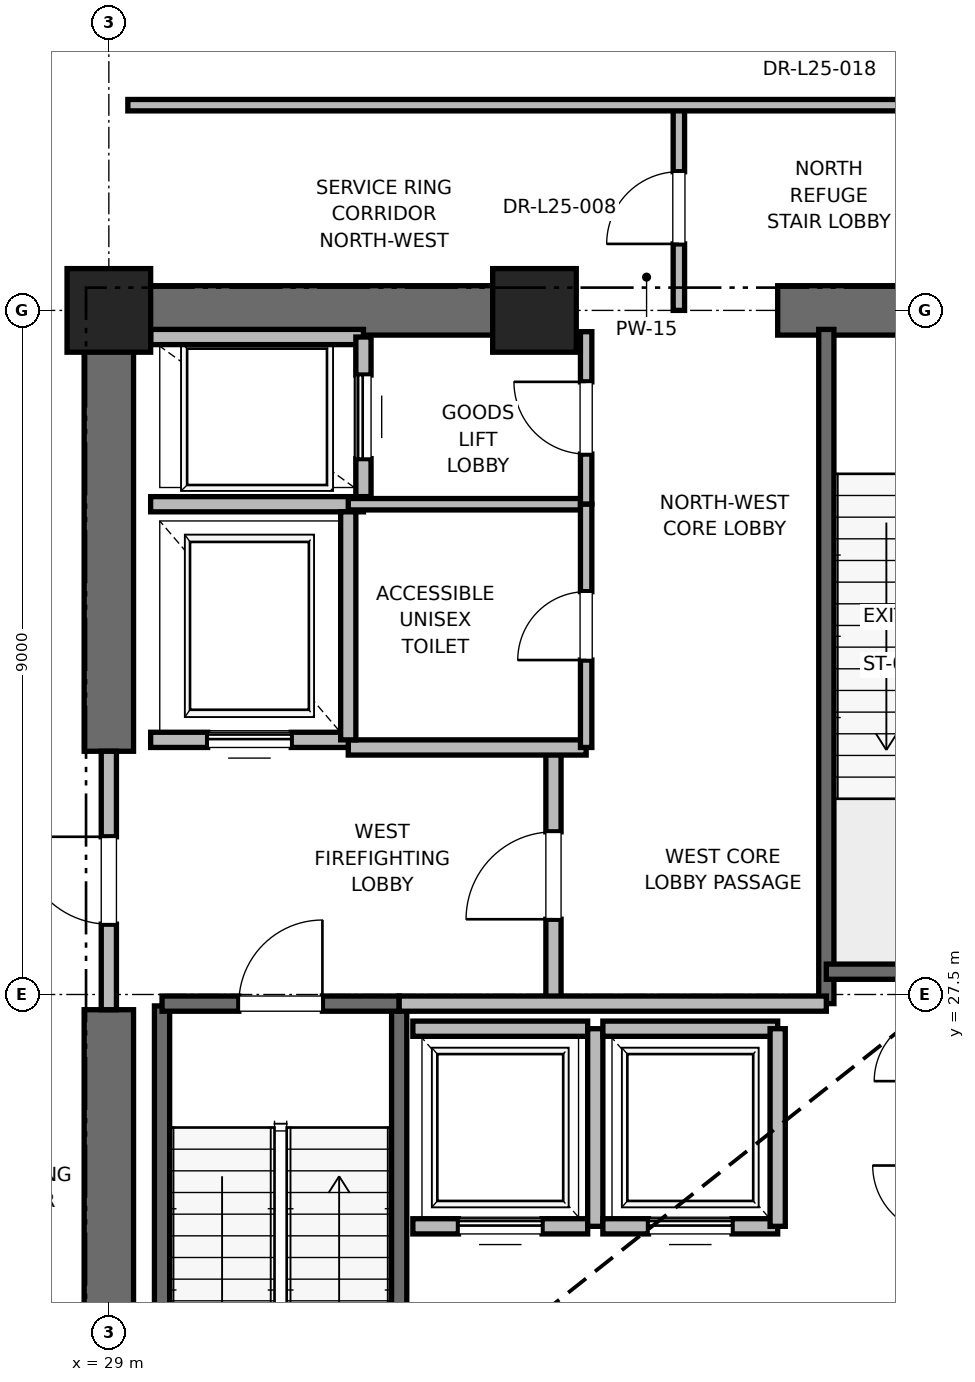
"""IFC4 building model, lengths in metres.
Left out: names, types, materials, properties, quantities, classifications, styles, units other than length and angle.
Written with IfcOpenShell. Run it as: python <this file> out.ifc"""

import sys

from ifc_helpers import new_model, si_unit, direction, frame, frame_2d, origin, origin_2d, place, context, subcontext, project, spatial, rectangle, extrude, element, fill, save


model = new_model("IFC4")
c1 = context("Model", 3, precision=1e-05, world=origin(), true_north=direction((0.0, 1.0)))
c2 = subcontext(c1, "Body", "Model", "MODEL_VIEW")
j1 = project(units=[si_unit("LENGTHUNIT", "METRE"), si_unit("PLANEANGLEUNIT", "RADIAN")], contexts=[c1])
p1 = place(None, origin())
s1 = spatial("IfcSite", under=j1, at=p1, CompositionType="ELEMENT")
p2 = place(p1, origin())
s2 = spatial("IfcBuilding", under=s1, at=p2, CompositionType="ELEMENT")
p3 = place(p2, frame((0.0, 0.0, 107.6)))
s3 = spatial("IfcBuildingStorey", under=s2, at=p3, CompositionType="ELEMENT", Elevation=107.6)
for number, where, z_axis, x_axis in (
    (1, (29.0, 36.5, 0.0), (0.0, 0.0, 1.0), (1.0, 0.0, 0.0)),
    (2, (34.6, 36.5, 0.0), (0.0, 0.0, 1.0), (1.0, 0.0, 0.0)),
):
    element("IfcColumn", number, at=place(p3, frame(where, z_axis=z_axis, x_axis=x_axis)), inside=s3, PredefinedType="PILASTER", context=c2, shape_type="SweptSolid", body=[
        extrude(rectangle(XDim=1.1, YDim=1.1, at=origin_2d()), origin(), (0.0, 0.0, 1.0), 5.4),
    ])
p4 = place(p3, frame((29.0, 36.5, 0.0), z_axis=(0.0, 0.0, 1.0), x_axis=(1.0, 0.0, 0.0)))
e3 = element("IfcWall", 3, at=p4, inside=s3, PredefinedType="SHEAR", context=c2, shape_type="SweptSolid", body=[
    extrude(rectangle(XDim=5.8, YDim=0.65, at=frame_2d((2.9, 0.0))), origin(), (0.0, 0.0, 1.0), 5.1),
])
p5 = place(p3, frame((37.8, 36.5, 0.0), z_axis=(0.0, 0.0, 1.0), x_axis=(1.0, 0.0, 0.0)))
e4 = element("IfcWall", 4, at=p5, inside=s3, PredefinedType="SHEAR", context=c2, shape_type="SweptSolid", body=[
    extrude(rectangle(XDim=4.4, YDim=0.65, at=frame_2d((2.2, 0.0))), origin(), (0.0, 0.0, 1.0), 5.1),
])
p6 = place(p5, frame((1.65, 0.0, 0.0)))
e5 = element("IfcOpeningElement", 5, at=p6, cuts=e4, PredefinedType="OPENING", context=c2, shape_type="SweptSolid", body=[
    extrude(rectangle(XDim=1.1, YDim=2.15, at=frame_2d((0.55, 1.075))), frame((0.0, 0.325, 0.0), z_axis=(0.0, -1.0, 0.0), x_axis=(1.0, 0.0, 0.0)), (0.0, 0.0, 1.0), 0.65),
])
p7 = place(p3, frame((29.0, 18.5, 0.0), z_axis=(0.0, 0.0, 1.0), x_axis=(0.0, 1.0, 0.0)))
e6 = element("IfcWall", 6, at=p7, inside=s3, PredefinedType="SHEAR", context=c2, shape_type="SweptSolid", body=[
    extrude(rectangle(XDim=8.8, YDim=0.65, at=frame_2d((4.4, 0.0))), origin(), (0.0, 0.0, 1.0), 5.1),
])
p8 = place(p3, frame((29.0, 30.7, 0.0), z_axis=(0.0, 0.0, 1.0), x_axis=(0.0, 1.0, 0.0)))
e7 = element("IfcWall", 7, at=p8, inside=s3, PredefinedType="SHEAR", context=c2, shape_type="SweptSolid", body=[
    extrude(rectangle(XDim=5.8, YDim=0.65, at=frame_2d((2.9, 0.0))), origin(), (0.0, 0.0, 1.0), 5.1),
])
p9 = place(p3, frame((29.7, 19.2, 0.0), z_axis=(0.0, 0.0, 1.0), x_axis=(0.0, 1.0, 0.0)))
e8 = element("IfcWall", 8, at=p9, inside=s3, PredefinedType="SOLIDWALL", context=c2, shape_type="SweptSolid", body=[
    extrude(rectangle(XDim=8.15, YDim=0.2, at=frame_2d((4.075, 0.0))), origin(), (0.0, 0.0, 1.0), 5.1),
])
p10 = place(p3, frame((32.82, 18.6, 0.0), z_axis=(0.0, 0.0, 1.0), x_axis=(0.0, 1.0, 0.0)))
e9 = element("IfcWall", 9, at=p10, inside=s3, PredefinedType="SOLIDWALL", context=c2, shape_type="SweptSolid", body=[
    extrude(rectangle(XDim=8.78, YDim=0.2, at=frame_2d((4.39, 0.0))), origin(), (0.0, 0.0, 1.0), 5.1),
])
p11 = place(p3, frame((29.7, 27.38, 0.0), z_axis=(0.0, 0.0, 1.0), x_axis=(1.0, 0.0, 0.0)))
e10 = element("IfcWall", 10, at=p11, inside=s3, PredefinedType="SOLIDWALL", context=c2, shape_type="SweptSolid", body=[
    extrude(rectangle(XDim=3.12, YDim=0.2, at=frame_2d((1.56, 0.0))), origin(), (0.0, 0.0, 1.0), 5.1),
])
p12 = place(p11, frame((1.01, 0.0, 0.0)))
e11 = element("IfcOpeningElement", 11, at=p12, cuts=e10, PredefinedType="OPENING", context=c2, shape_type="SweptSolid", body=[
    extrude(rectangle(XDim=1.1, YDim=2.15, at=frame_2d((0.55, 1.075))), frame((0.0, 0.1, 0.0), z_axis=(0.0, -1.0, 0.0), x_axis=(1.0, 0.0, 0.0)), (0.0, 0.0, 1.0), 0.2),
])
p13 = place(p3, frame((38.44, 27.38, 0.0), z_axis=(0.0, 0.0, 1.0), x_axis=(0.0, 1.0, 0.0)))
e12 = element("IfcWall", 12, at=p13, inside=s3, PredefinedType="SOLIDWALL", context=c2, shape_type="SweptSolid", body=[
    extrude(rectangle(XDim=8.87, YDim=0.2, at=frame_2d((4.435, 0.0))), origin(), (0.0, 0.0, 1.0), 5.1),
])
p14 = place(p3, frame((38.44, 27.8, 0.0), z_axis=(0.0, 0.0, 1.0), x_axis=(1.0, 0.0, 0.0)))
e13 = element("IfcWall", 13, at=p14, inside=s3, PredefinedType="SOLIDWALL", context=c2, shape_type="SweptSolid", body=[
    extrude(rectangle(XDim=3.32, YDim=0.2, at=frame_2d((1.66, 0.0))), origin(), (0.0, 0.0, 1.0), 5.1),
])
p15 = place(p3, frame((34.85, 27.38, 0.0), z_axis=(0.0, 0.0, 1.0), x_axis=(0.0, 1.0, 0.0)))
e14 = element("IfcWall", 14, at=p15, inside=s3, PredefinedType="PARTITIONING", context=c2, shape_type="SweptSolid", body=[
    extrude(rectangle(XDim=3.37, YDim=0.2, at=frame_2d((1.685, 0.0))), origin(), (0.0, 0.0, 1.0), 5.1),
])
p16 = place(p15, frame((1.11, 0.0, 0.0)))
e15 = element("IfcOpeningElement", 15, at=p16, cuts=e14, PredefinedType="OPENING", context=c2, shape_type="SweptSolid", body=[
    extrude(rectangle(XDim=1.15, YDim=2.2, at=frame_2d((0.575, 1.1))), frame((0.0, 0.1, 0.0), z_axis=(0.0, -1.0, 0.0), x_axis=(1.0, 0.0, 0.0)), (0.0, 0.0, 1.0), 0.2),
])
p17 = place(p3, frame((29.0, 27.3, 0.0), z_axis=(0.0, 0.0, 1.0), x_axis=(0.0, 1.0, 0.0)))
e16 = element("IfcWall", 16, at=p17, inside=s3, PredefinedType="PARTITIONING", context=c2, shape_type="SweptSolid", body=[
    extrude(rectangle(XDim=3.4, YDim=0.2, at=frame_2d((1.7, 0.0))), origin(), (0.0, 0.0, 1.0), 3.88),
])
p18 = place(p17, frame((1.125, 0.0, 0.0)))
e17 = element("IfcOpeningElement", 17, at=p18, cuts=e16, PredefinedType="OPENING", context=c2, shape_type="SweptSolid", body=[
    extrude(rectangle(XDim=1.15, YDim=2.2, at=frame_2d((0.575, 1.1))), frame((0.0, 0.1, 0.0), z_axis=(0.0, -1.0, 0.0), x_axis=(1.0, 0.0, 0.0)), (0.0, 0.0, 1.0), 0.2),
])
p19 = place(p3, frame((32.82, 27.38, 0.0), z_axis=(0.0, 0.0, 1.0), x_axis=(1.0, 0.0, 0.0)))
e18 = element("IfcWall", 18, at=p19, inside=s3, PredefinedType="PARTITIONING", context=c2, shape_type="SweptSolid", body=[
    extrude(rectangle(XDim=5.62, YDim=0.2, at=frame_2d((2.81, 0.0))), origin(), (0.0, 0.0, 1.0), 5.1),
])
p20 = place(p3, frame((32.15, 30.75, 0.0), z_axis=(0.0, 0.0, 1.0), x_axis=(1.0, 0.0, 0.0)))
e19 = element("IfcWall", 19, at=p20, inside=s3, PredefinedType="PARTITIONING", context=c2, shape_type="SweptSolid", body=[
    extrude(rectangle(XDim=3.13, YDim=0.2, at=frame_2d((1.565, 0.0))), origin(), (0.0, 0.0, 1.0), 5.1),
])
p21 = place(p3, frame((29.55, 30.85, 0.0), z_axis=(0.0, 0.0, 1.0), x_axis=(1.0, 0.0, 0.0)))
e20 = element("IfcWall", 20, at=p21, inside=s3, PredefinedType="SOLIDWALL", context=c2, shape_type="SweptSolid", body=[
    extrude(rectangle(XDim=2.6, YDim=0.2, at=frame_2d((1.3, 0.0))), origin(), (0.0, 0.0, 1.0), 3.88),
])
p22 = place(p21, frame((0.75, 0.0, 0.0)))
e21 = element("IfcOpeningElement", 21, at=p22, cuts=e20, PredefinedType="OPENING", context=c2, shape_type="SweptSolid", body=[
    extrude(rectangle(XDim=1.1, YDim=2.2, at=frame_2d((0.55, 1.1))), frame((0.0, 0.1, 0.0), z_axis=(0.0, -1.0, 0.0), x_axis=(1.0, 0.0, 0.0)), (0.0, 0.0, 1.0), 0.2),
])
p23 = place(p3, frame((29.55, 33.95, 0.0), z_axis=(0.0, 0.0, 1.0), x_axis=(1.0, 0.0, 0.0)))
e22 = element("IfcWall", 22, at=p23, inside=s3, PredefinedType="SOLIDWALL", context=c2, shape_type="SweptSolid", body=[
    extrude(rectangle(XDim=2.8, YDim=0.2, at=frame_2d((1.4, 0.0))), origin(), (0.0, 0.0, 1.0), 5.1),
])
p24 = place(p3, frame((32.15, 30.85, 0.0), z_axis=(0.0, 0.0, 1.0), x_axis=(0.0, 1.0, 0.0)))
e23 = element("IfcWall", 23, at=p24, inside=s3, PredefinedType="SOLIDWALL", context=c2, shape_type="SweptSolid", body=[
    extrude(rectangle(XDim=3.0, YDim=0.2, at=frame_2d((1.5, 0.0))), origin(), (0.0, 0.0, 1.0), 5.1),
])
p25 = place(p3, frame((32.35, 36.15, 0.0), z_axis=(0.0, 0.0, 1.0), x_axis=(-1.0, 0.0, 0.0)))
e24 = element("IfcWall", 24, at=p25, inside=s3, PredefinedType="SOLIDWALL", context=c2, shape_type="SweptSolid", body=[
    extrude(rectangle(XDim=2.8, YDim=0.2, at=frame_2d((1.4, 0.0))), origin(), (0.0, 0.0, 1.0), 4.153),
])
p26 = place(p3, frame((32.35, 34.05, 0.0), z_axis=(0.0, 0.0, 1.0), x_axis=(0.0, 1.0, 0.0)))
e25 = element("IfcWall", 25, at=p26, inside=s3, PredefinedType="SOLIDWALL", context=c2, shape_type="SweptSolid", body=[
    extrude(rectangle(XDim=2.1, YDim=0.2, at=frame_2d((1.05, 0.0))), origin(), (0.0, 0.0, 1.0), 5.1),
])
p27 = place(p26, frame((0.5, 0.0, 0.0)))
e26 = element("IfcOpeningElement", 26, at=p27, cuts=e25, PredefinedType="OPENING", context=c2, shape_type="SweptSolid", body=[
    extrude(rectangle(XDim=1.1, YDim=2.2, at=frame_2d((0.55, 1.1))), frame((0.0, 0.1, 0.0), z_axis=(0.0, -1.0, 0.0), x_axis=(1.0, 0.0, 0.0)), (0.0, 0.0, 1.0), 0.2),
])
p28 = place(p3, frame((33.0, 24.45, 0.0), z_axis=(0.0, 0.0, 1.0), x_axis=(1.0, 0.0, 0.0)))
e27 = element("IfcWall", 27, at=p28, inside=s3, PredefinedType="SOLIDWALL", context=c2, shape_type="SweptSolid", body=[
    extrude(rectangle(XDim=2.3, YDim=0.2, at=frame_2d((1.15, 0.0))), origin(), (0.0, 0.0, 1.0), 5.1),
])
p29 = place(p28, frame((0.6, 0.0, 0.0)))
e28 = element("IfcOpeningElement", 28, at=p29, cuts=e27, PredefinedType="OPENING", context=c2, shape_type="SweptSolid", body=[
    extrude(rectangle(XDim=1.1, YDim=2.2, at=frame_2d((0.55, 1.1))), frame((0.0, 0.1, 0.0), z_axis=(0.0, -1.0, 0.0), x_axis=(1.0, 0.0, 0.0)), (0.0, 0.0, 1.0), 0.2),
])
p30 = place(p3, frame((35.3, 27.05, 0.0), z_axis=(0.0, 0.0, 1.0), x_axis=(-1.0, 0.0, 0.0)))
e29 = element("IfcWall", 29, at=p30, inside=s3, PredefinedType="SOLIDWALL", context=c2, shape_type="SweptSolid", body=[
    extrude(rectangle(XDim=2.3, YDim=0.2, at=frame_2d((1.15, 0.0))), origin(), (0.0, 0.0, 1.0), 5.1),
])
p31 = place(p3, frame((35.4, 24.45, 0.0), z_axis=(0.0, 0.0, 1.0), x_axis=(0.0, 1.0, 0.0)))
e30 = element("IfcWall", 30, at=p31, inside=s3, PredefinedType="SOLIDWALL", context=c2, shape_type="SweptSolid", body=[
    extrude(rectangle(XDim=2.6, YDim=0.2, at=frame_2d((1.3, 0.0))), origin(), (0.0, 0.0, 1.0), 5.1),
])
p32 = place(p3, frame((35.5, 24.45, 0.0), z_axis=(0.0, 0.0, 1.0), x_axis=(1.0, 0.0, 0.0)))
e31 = element("IfcWall", 31, at=p32, inside=s3, PredefinedType="SOLIDWALL", context=c2, shape_type="SweptSolid", body=[
    extrude(rectangle(XDim=2.3, YDim=0.2, at=frame_2d((1.15, 0.0))), origin(), (0.0, 0.0, 1.0), 5.1),
])
p33 = place(p32, frame((0.6, 0.0, 0.0)))
e32 = element("IfcOpeningElement", 32, at=p33, cuts=e31, PredefinedType="OPENING", context=c2, shape_type="SweptSolid", body=[
    extrude(rectangle(XDim=1.1, YDim=2.2, at=frame_2d((0.55, 1.1))), frame((0.0, 0.1, 0.0), z_axis=(0.0, -1.0, 0.0), x_axis=(1.0, 0.0, 0.0)), (0.0, 0.0, 1.0), 0.2),
])
p34 = place(p3, frame((37.8, 27.05, 0.0), z_axis=(0.0, 0.0, 1.0), x_axis=(-1.0, 0.0, 0.0)))
e33 = element("IfcWall", 33, at=p34, inside=s3, PredefinedType="SOLIDWALL", context=c2, shape_type="SweptSolid", body=[
    extrude(rectangle(XDim=2.3, YDim=0.2, at=frame_2d((1.15, 0.0))), origin(), (0.0, 0.0, 1.0), 5.1),
])
p35 = place(p3, frame((37.8, 24.45, 0.0), z_axis=(0.0, 0.0, 1.0), x_axis=(0.0, 1.0, 0.0)))
e34 = element("IfcWall", 34, at=p35, inside=s3, PredefinedType="SOLIDWALL", context=c2, shape_type="SweptSolid", body=[
    extrude(rectangle(XDim=2.6, YDim=0.2, at=frame_2d((1.3, 0.0))), origin(), (0.0, 0.0, 1.0), 5.1),
])
p36 = place(p3, frame((32.15, 33.95, 0.0), z_axis=(0.0, 0.0, 1.0), x_axis=(1.0, 0.0, 0.0)))
e35 = element("IfcWall", 35, at=p36, inside=s3, PredefinedType="PARTITIONING", context=c2, shape_type="SweptSolid", body=[
    extrude(rectangle(XDim=3.13, YDim=0.15, at=frame_2d((1.565, 0.0))), origin(), (0.0, 0.0, 1.0), 2.85),
])
p37 = place(p3, frame((35.28, 33.95, 0.0), z_axis=(0.0, 0.0, 1.0), x_axis=(0.0, 1.0, 0.0)))
e36 = element("IfcWall", 36, at=p37, inside=s3, PredefinedType="PARTITIONING", context=c2, shape_type="SweptSolid", body=[
    extrude(rectangle(XDim=2.27, YDim=0.15, at=frame_2d((1.135, 0.0))), origin(), (0.0, 0.0, 1.0), 2.85),
])
p38 = place(p37, frame((0.66, 0.0, 0.0)))
e37 = element("IfcOpeningElement", 37, at=p38, cuts=e36, PredefinedType="OPENING", context=c2, shape_type="SweptSolid", body=[
    extrude(rectangle(XDim=0.95, YDim=2.15, at=frame_2d((0.475, 1.075))), frame((0.0, 0.075, 0.0), z_axis=(0.0, -1.0, 0.0), x_axis=(1.0, 0.0, 0.0)), (0.0, 0.0, 1.0), 0.15),
])
p39 = place(p3, frame((35.28, 30.75, 0.0), z_axis=(0.0, 0.0, 1.0), x_axis=(0.0, 1.0, 0.0)))
e38 = element("IfcWall", 38, at=p39, inside=s3, PredefinedType="PARTITIONING", context=c2, shape_type="SweptSolid", body=[
    extrude(rectangle(XDim=3.2, YDim=0.15, at=frame_2d((1.6, 0.0))), origin(), (0.0, 0.0, 1.0), 2.85),
])
p40 = place(p39, frame((1.15, 0.0, 0.0)))
e39 = element("IfcOpeningElement", 39, at=p40, cuts=e38, PredefinedType="OPENING", context=c2, shape_type="SweptSolid", body=[
    extrude(rectangle(XDim=0.9, YDim=2.1, at=frame_2d((0.45, 1.05))), frame((0.0, 0.075, 0.0), z_axis=(0.0, -1.0, 0.0), x_axis=(1.0, 0.0, 0.0)), (0.0, 0.0, 1.0), 0.15),
])
p41 = place(p3, frame((36.5, 36.5, 0.0), z_axis=(0.0, 0.0, 1.0), x_axis=(0.0, 1.0, 0.0)))
e40 = element("IfcWall", 40, at=p41, inside=s3, PredefinedType="PARTITIONING", context=c2, shape_type="SweptSolid", body=[
    extrude(rectangle(XDim=2.7, YDim=0.15, at=frame_2d((1.35, 0.0))), origin(), (0.0, 0.0, 1.0), 2.85),
])
p42 = place(p41, frame((0.875, 0.0, 0.0)))
e41 = element("IfcOpeningElement", 41, at=p42, cuts=e40, PredefinedType="OPENING", context=c2, shape_type="SweptSolid", body=[
    extrude(rectangle(XDim=0.95, YDim=2.15, at=frame_2d((0.475, 1.075))), frame((0.0, 0.075, 0.0), z_axis=(0.0, -1.0, 0.0), x_axis=(1.0, 0.0, 0.0)), (0.0, 0.0, 1.0), 0.15),
])
p43 = place(p3, frame((29.25, 39.2, 0.0), z_axis=(0.0, 0.0, 1.0), x_axis=(1.0, 0.0, 0.0)))
e42 = element("IfcWall", 42, at=p43, inside=s3, PredefinedType="PARTITIONING", context=c2, shape_type="SweptSolid", body=[
    extrude(rectangle(XDim=21.5, YDim=0.15, at=frame_2d((10.75, 0.0))), origin(), (0.0, 0.0, 1.0), 2.85),
])
p44 = place(p43, frame((10.275, 0.0, 0.0)))
e43 = element("IfcOpeningElement", 43, at=p44, cuts=e42, PredefinedType="OPENING", context=c2, shape_type="SweptSolid", body=[
    extrude(rectangle(XDim=0.95, YDim=2.15, at=frame_2d((0.475, 1.075))), frame((0.0, 0.075, 0.0), z_axis=(0.0, -1.0, 0.0), x_axis=(1.0, 0.0, 0.0)), (0.0, 0.0, 1.0), 0.15),
])
p45 = place(p12, origin())
e44 = element("IfcDoor", 44, at=p45, inside=s3, OperationType="SINGLE_SWING_RIGHT", PredefinedType="DOOR", context=c2, shape_type="SweptSolid", body=[
    extrude(rectangle(XDim=1.1, YDim=2.15, at=frame_2d((0.55, 1.075))), frame((0.0, 0.025, 0.0), z_axis=(0.0, -1.0, 0.0), x_axis=(1.0, 0.0, 0.0)), (0.0, 0.0, 1.0), 0.05),
])
fill(e11, e44)
p46 = place(p16, origin())
e45 = element("IfcDoor", 45, at=p46, inside=s3, OperationType="SINGLE_SWING_LEFT", PredefinedType="DOOR", context=c2, shape_type="SweptSolid", body=[
    extrude(rectangle(XDim=1.15, YDim=2.2, at=frame_2d((0.575, 1.1))), frame((0.0, 0.025, 0.0), z_axis=(0.0, -1.0, 0.0), x_axis=(1.0, 0.0, 0.0)), (0.0, 0.0, 1.0), 0.05),
])
fill(e15, e45)
p47 = place(p18, origin())
e46 = element("IfcDoor", 46, at=p47, inside=s3, OperationType="SINGLE_SWING_RIGHT", PredefinedType="DOOR", context=c2, shape_type="SweptSolid", body=[
    extrude(rectangle(XDim=1.15, YDim=2.2, at=frame_2d((0.575, 1.1))), frame((0.0, 0.025, 0.0), z_axis=(0.0, -1.0, 0.0), x_axis=(1.0, 0.0, 0.0)), (0.0, 0.0, 1.0), 0.05),
])
fill(e17, e46)
p48 = place(p22, origin())
e47 = element("IfcDoor", 47, at=p48, inside=s3, OperationType="SLIDING_TO_RIGHT", PredefinedType="DOOR", context=c2, shape_type="SweptSolid", body=[
    extrude(rectangle(XDim=1.1, YDim=2.2, at=frame_2d((0.55, 1.1))), frame((0.0, 0.025, 0.0), z_axis=(0.0, -1.0, 0.0), x_axis=(1.0, 0.0, 0.0)), (0.0, 0.0, 1.0), 0.05),
])
fill(e21, e47)
p49 = place(p27, origin())
e48 = element("IfcDoor", 48, at=p49, inside=s3, OperationType="SLIDING_TO_RIGHT", PredefinedType="DOOR", context=c2, shape_type="SweptSolid", body=[
    extrude(rectangle(XDim=1.1, YDim=2.2, at=frame_2d((0.55, 1.1))), frame((0.0, 0.025, 0.0), z_axis=(0.0, -1.0, 0.0), x_axis=(1.0, 0.0, 0.0)), (0.0, 0.0, 1.0), 0.05),
])
fill(e26, e48)
p50 = place(p29, origin())
e49 = element("IfcDoor", 49, at=p50, inside=s3, OperationType="SLIDING_TO_RIGHT", PredefinedType="DOOR", context=c2, shape_type="SweptSolid", body=[
    extrude(rectangle(XDim=1.1, YDim=2.2, at=frame_2d((0.55, 1.1))), frame((0.0, 0.025, 0.0), z_axis=(0.0, -1.0, 0.0), x_axis=(1.0, 0.0, 0.0)), (0.0, 0.0, 1.0), 0.05),
])
fill(e28, e49)
p51 = place(p33, origin())
e50 = element("IfcDoor", 50, at=p51, inside=s3, OperationType="SLIDING_TO_RIGHT", PredefinedType="DOOR", context=c2, shape_type="SweptSolid", body=[
    extrude(rectangle(XDim=1.1, YDim=2.2, at=frame_2d((0.55, 1.1))), frame((0.0, 0.025, 0.0), z_axis=(0.0, -1.0, 0.0), x_axis=(1.0, 0.0, 0.0)), (0.0, 0.0, 1.0), 0.05),
])
fill(e32, e50)
p52 = place(p38, origin())
e51 = element("IfcDoor", 51, at=p52, inside=s3, OperationType="SINGLE_SWING_RIGHT", PredefinedType="DOOR", context=c2, shape_type="SweptSolid", body=[
    extrude(rectangle(XDim=0.95, YDim=2.15, at=frame_2d((0.475, 1.075))), frame((0.0, 0.025, 0.0), z_axis=(0.0, -1.0, 0.0), x_axis=(1.0, 0.0, 0.0)), (0.0, 0.0, 1.0), 0.05),
])
fill(e37, e51)
p53 = place(p40, origin())
e52 = element("IfcDoor", 52, at=p53, inside=s3, OperationType="SINGLE_SWING_LEFT", PredefinedType="DOOR", context=c2, shape_type="SweptSolid", body=[
    extrude(rectangle(XDim=0.9, YDim=2.1, at=frame_2d((0.45, 1.05))), frame((0.0, 0.025, 0.0), z_axis=(0.0, -1.0, 0.0), x_axis=(1.0, 0.0, 0.0)), (0.0, 0.0, 1.0), 0.05),
])
fill(e39, e52)
p54 = place(p42, origin())
e53 = element("IfcDoor", 53, at=p54, inside=s3, OperationType="SINGLE_SWING_LEFT", PredefinedType="DOOR", context=c2, shape_type="SweptSolid", body=[
    extrude(rectangle(XDim=0.95, YDim=2.15, at=frame_2d((0.475, 1.075))), frame((0.0, 0.025, 0.0), z_axis=(0.0, -1.0, 0.0), x_axis=(1.0, 0.0, 0.0)), (0.0, 0.0, 1.0), 0.05),
])
fill(e41, e53)
save(model, sys.argv[1])
